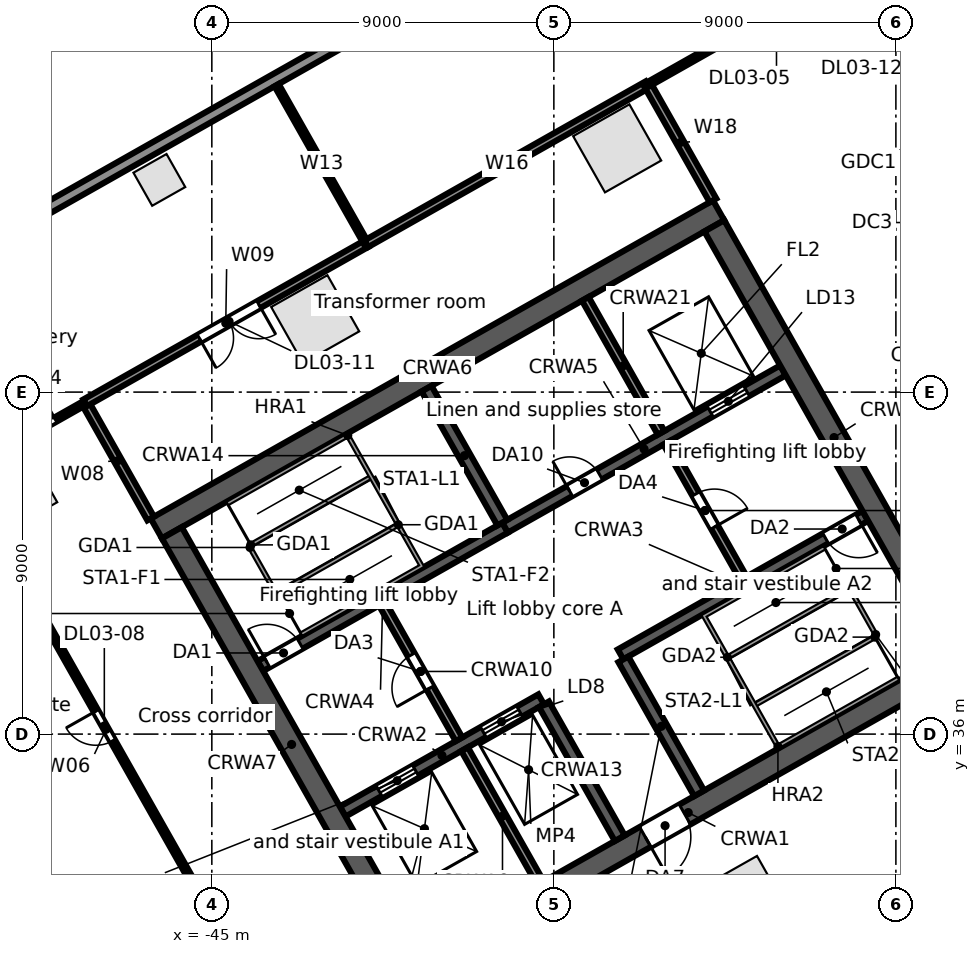
"""IFC4 building model, lengths in metres.
Left out: names, types, materials, properties, quantities, classifications, styles, units other than length and angle.
Written with IfcOpenShell. Run it as: python <this file> out.ifc"""

import sys

from ifc_helpers import new_model, si_unit, direction, frame, frame_2d, origin, origin_2d, place, context, subcontext, project, spatial, rectangle, extrude, element, fill, save


model = new_model("IFC4")
c1 = context("Model", 3, precision=1e-05, world=origin(), true_north=direction((0.0, 1.0)))
c2 = subcontext(c1, "Body", "Model", "MODEL_VIEW")
j1 = project(units=[si_unit("LENGTHUNIT", "METRE"), si_unit("PLANEANGLEUNIT", "RADIAN")], contexts=[c1])
p1 = place(None, origin())
s1 = spatial("IfcSite", under=j1, at=p1, CompositionType="ELEMENT")
p2 = place(p1, origin())
s2 = spatial("IfcBuilding", under=s1, at=p2, CompositionType="ELEMENT")
p3 = place(p2, frame((0.0, 0.0, 21.5)))
s3 = spatial("IfcBuildingStorey", under=s2, at=p3, CompositionType="ELEMENT", Elevation=21.5)
for number, where, z_axis, x_axis in (
    (1, (-34.334, 51.414, 0.0), (0.0, 0.0, 1.0), (-0.87, -0.492, 0.0)),
    (2, (-42.28, 46.919, 0.0), (0.0, 0.0, 1.0), (-0.87, -0.492, 0.0)),
    (3, (-50.226, 42.423, 0.0), (0.0, 0.0, 1.0), (-0.87, -0.492, 0.0)),
    (4, (-30.976, 31.635, 0.0), (0.0, 0.0, 1.0), (0.87, 0.492, 0.0)),
):
    element("IfcColumn", number, at=place(p3, frame(where, z_axis=z_axis, x_axis=x_axis)), inside=s3, PredefinedType="COLUMN", context=c2, shape_type="SweptSolid", body=[
        extrude(rectangle(XDim=1.7, YDim=1.7, at=origin_2d()), origin(), (0.0, 0.0, 1.0), 5.0),
    ])
p4 = place(p3, frame((-46.381, 50.584, 0.0), z_axis=(0.0, 0.0, 1.0), x_axis=(-0.87035569594, -0.492423560103, 0.0)))
e5 = element("IfcColumn", 5, at=p4, inside=s3, PredefinedType="COLUMN", context=c2, shape_type="SweptSolid", body=[
    extrude(rectangle(XDim=1.0, YDim=1.0, at=origin_2d()), origin(), (0.0, 0.0, 1.0), 4.68),
])
p5 = place(p3, frame((-63.707, 41.701, 0.0), z_axis=(0.0, 0.0, 1.0), x_axis=(0.870355510268, 0.492423888277, 0.0)))
e6 = element("IfcWall", 6, at=p5, inside=s3, PredefinedType="STANDARD", context=c2, shape_type="SweptSolid", body=[
    extrude(rectangle(XDim=67.903, YDim=0.3, at=frame_2d((33.952, 0.0))), origin(), (0.0, 0.0, 1.0), 4.68),
])
p6 = place(p3, frame((-45.526, 21.522, 0.0), z_axis=(0.0, 0.0, 1.0), x_axis=(-0.857164837164, 0.515042174903, 0.0)))
e7 = element("IfcWall", 7, at=p6, inside=s3, PredefinedType="STANDARD", context=c2, shape_type="SweptSolid", body=[
    extrude(rectangle(XDim=21.35, YDim=0.3, at=frame_2d((10.675, 0.0))), origin(), (0.0, 0.0, 1.0), 4.68),
])
p7 = place(p3, frame((-39.862, 29.749, 0.0), z_axis=(0.0, 0.0, 1.0), x_axis=(0.870350116061, 0.492433422375, 0.0)))
e8 = element("IfcWall", 8, at=p7, inside=s3, PredefinedType="SOLIDWALL", context=c2, shape_type="SweptSolid", body=[
    extrude(rectangle(XDim=17.0, YDim=0.6, at=frame_2d((8.5, 0.0))), origin(), (0.0, 0.0, 1.0), 4.68),
])
p8 = place(p7, frame((7.2, 0.0, 0.0)))
e9 = element("IfcOpeningElement", 9, at=p8, cuts=e8, PredefinedType="OPENING", context=c2, shape_type="SweptSolid", body=[
    extrude(rectangle(XDim=1.2, YDim=2.1, at=frame_2d((0.6, 1.05))), frame((0.0, 0.31, 0.0), z_axis=(0.0, -1.0, 0.0), x_axis=(1.0, 0.0, 0.0)), (0.0, 0.0, 1.0), 0.62),
])
p9 = place(p3, frame((-41.556, 33.961, 0.0), z_axis=(0.0, 0.0, 1.0), x_axis=(0.870343731308, 0.492444706919, 0.0)))
e10 = element("IfcWall", 10, at=p9, inside=s3, PredefinedType="SOLIDWALL", context=c2, shape_type="SweptSolid", body=[
    extrude(rectangle(XDim=6.0, YDim=0.3, at=frame_2d((3.0, 0.0))), origin(), (0.0, 0.0, 1.0), 4.68),
])
p10 = place(p9, frame((1.1, 0.0, 0.0)))
e11 = element("IfcOpeningElement", 11, at=p10, cuts=e10, PredefinedType="OPENING", context=c2, shape_type="SweptSolid", body=[
    extrude(rectangle(XDim=1.1, YDim=2.1, at=frame_2d((0.55, 1.05))), frame((0.0, 0.16, 0.0), z_axis=(0.0, -1.0, 0.0), x_axis=(1.0, 0.0, 0.0)), (0.0, 0.0, 1.0), 0.32),
])
p11 = place(p9, frame((4.25, 0.0, 0.0)))
e12 = element("IfcOpeningElement", 12, at=p11, cuts=e10, PredefinedType="OPENING", context=c2, shape_type="SweptSolid", body=[
    extrude(rectangle(XDim=1.1, YDim=2.1, at=frame_2d((0.55, 1.05))), frame((0.0, 0.16, 0.0), z_axis=(0.0, -1.0, 0.0), x_axis=(1.0, 0.0, 0.0)), (0.0, 0.0, 1.0), 0.32),
])
p12 = place(p3, frame((-34.245, 38.097, 0.0), z_axis=(0.0, 0.0, 1.0), x_axis=(0.870364910201, 0.492407273597, 0.0)))
e13 = element("IfcWall", 13, at=p12, inside=s3, PredefinedType="SOLIDWALL", context=c2, shape_type="SweptSolid", body=[
    extrude(rectangle(XDim=7.4, YDim=0.3, at=frame_2d((3.7, 0.0))), origin(), (0.0, 0.0, 1.0), 4.68),
])
p13 = place(p12, frame((6.2, 0.0, 0.0)))
e14 = element("IfcOpeningElement", 14, at=p13, cuts=e13, PredefinedType="OPENING", context=c2, shape_type="SweptSolid", body=[
    extrude(rectangle(XDim=1.0, YDim=2.1, at=frame_2d((0.5, 1.05))), frame((0.0, 0.16, 0.0), z_axis=(0.0, -1.0, 0.0), x_axis=(1.0, 0.0, 0.0)), (0.0, 0.0, 1.0), 0.32),
])
p14 = place(p3, frame((-43.723, 37.791, 0.0), z_axis=(0.0, 0.0, 1.0), x_axis=(0.87035077051, 0.49243226567, 0.0)))
e15 = element("IfcWall", 15, at=p14, inside=s3, PredefinedType="SOLIDWALL", context=c2, shape_type="SweptSolid", body=[
    extrude(rectangle(XDim=7.4, YDim=0.3, at=frame_2d((3.7, 0.0))), origin(), (0.0, 0.0, 1.0), 4.68),
])
p15 = place(p14, frame((0.2, 0.0, 0.0)))
e16 = element("IfcOpeningElement", 16, at=p15, cuts=e15, PredefinedType="OPENING", context=c2, shape_type="SweptSolid", body=[
    extrude(rectangle(XDim=1.0, YDim=2.1, at=frame_2d((0.5, 1.05))), frame((0.0, 0.16, 0.0), z_axis=(0.0, -1.0, 0.0), x_axis=(1.0, 0.0, 0.0)), (0.0, 0.0, 1.0), 0.32),
])
p16 = place(p3, frame((-37.282, 41.435, 0.0), z_axis=(0.0, 0.0, 1.0), x_axis=(0.870356516133, 0.492422110414, 0.0)))
e17 = element("IfcWall", 17, at=p16, inside=s3, PredefinedType="SOLIDWALL", context=c2, shape_type="SweptSolid", body=[
    extrude(rectangle(XDim=8.4, YDim=0.3, at=frame_2d((4.2, 0.0))), origin(), (0.0, 0.0, 1.0), 4.68),
])
p17 = place(p16, frame((6.2, 0.0, 0.0)))
e18 = element("IfcOpeningElement", 18, at=p17, cuts=e17, PredefinedType="OPENING", context=c2, shape_type="SweptSolid", body=[
    extrude(rectangle(XDim=1.1, YDim=2.1, at=frame_2d((0.55, 1.05))), frame((0.0, 0.16, 0.0), z_axis=(0.0, -1.0, 0.0), x_axis=(1.0, 0.0, 0.0)), (0.0, 0.0, 1.0), 0.32),
])
p18 = place(p16, frame((1.95, 0.0, 0.0)))
e19 = element("IfcOpeningElement", 19, at=p18, cuts=e17, PredefinedType="OPENING", context=c2, shape_type="SweptSolid", body=[
    extrude(rectangle(XDim=0.9, YDim=2.1, at=frame_2d((0.45, 1.05))), frame((0.0, 0.16, 0.0), z_axis=(0.0, -1.0, 0.0), x_axis=(1.0, 0.0, 0.0)), (0.0, 0.0, 1.0), 0.32),
])
p19 = place(p3, frame((-46.461, 41.412, 0.0), z_axis=(0.0, 0.0, 1.0), x_axis=(0.870350116061, 0.492433422375, 0.0)))
e20 = element("IfcWall", 20, at=p19, inside=s3, PredefinedType="SOLIDWALL", context=c2, shape_type="SweptSolid", body=[
    extrude(rectangle(XDim=17.0, YDim=0.6, at=frame_2d((8.5, 0.0))), origin(), (0.0, 0.0, 1.0), 4.68),
])
p20 = place(p3, frame((-46.052, 41.298, 0.0), z_axis=(0.0, 0.0, 1.0), x_axis=(0.492418598281, -0.870358503186, 0.0)))
e21 = element("IfcWall", 21, at=p20, inside=s3, PredefinedType="SOLIDWALL", context=c2, shape_type="SweptSolid", body=[
    extrude(rectangle(XDim=12.8, YDim=0.6, at=frame_2d((6.4, 0.0))), origin(), (0.0, 0.0, 1.0), 4.68),
])
p21 = place(p3, frame((-38.349, 35.603, 0.0), z_axis=(0.0, 0.0, 1.0), x_axis=(0.49241474071, -0.870360685654, 0.0)))
e22 = element("IfcWall", 22, at=p21, inside=s3, PredefinedType="SOLIDWALL", context=c2, shape_type="SweptSolid", body=[
    extrude(rectangle(XDim=4.05, YDim=0.2, at=frame_2d((2.025, 0.0))), origin(), (0.0, 0.0, 1.0), 4.68),
])
p22 = place(p3, frame((-40.516, 39.433, 0.0), z_axis=(0.0, 0.0, 1.0), x_axis=(0.492453559952, -0.87033872216, 0.0)))
e23 = element("IfcWall", 23, at=p22, inside=s3, PredefinedType="PARTITIONING", context=c2, shape_type="SweptSolid", body=[
    extrude(rectangle(XDim=4.1, YDim=0.2, at=frame_2d((2.05, 0.0))), origin(), (0.0, 0.0, 1.0), 4.68),
])
p23 = place(p22, frame((1.55, 0.0, 0.0)))
e24 = element("IfcOpeningElement", 24, at=p23, cuts=e23, PredefinedType="OPENING", context=c2, shape_type="SweptSolid", body=[
    extrude(rectangle(XDim=1.0, YDim=2.1, at=frame_2d((0.5, 1.05))), frame((0.0, 0.11, 0.0), z_axis=(0.0, -1.0, 0.0), x_axis=(1.0, 0.0, 0.0)), (0.0, 0.0, 1.0), 0.22),
])
p24 = place(p3, frame((-36.26, 36.785, 0.0), z_axis=(0.0, 0.0, 1.0), x_axis=(0.492440575896, -0.870346068648, 0.0)))
e25 = element("IfcWall", 25, at=p24, inside=s3, PredefinedType="SOLIDWALL", context=c2, shape_type="SweptSolid", body=[
    extrude(rectangle(XDim=4.05, YDim=0.3, at=frame_2d((2.025, 0.0))), origin(), (0.0, 0.0, 1.0), 4.68),
])
p25 = place(p3, frame((-39.35, 45.09, 0.0), z_axis=(0.0, 0.0, 1.0), x_axis=(0.49241474071, -0.870360685654, 0.0)))
e26 = element("IfcWall", 26, at=p25, inside=s3, PredefinedType="SOLIDWALL", context=c2, shape_type="SweptSolid", body=[
    extrude(rectangle(XDim=4.05, YDim=0.3, at=frame_2d((2.025, 0.0))), origin(), (0.0, 0.0, 1.0), 4.68),
])
p26 = place(p3, frame((-34.171, 37.967, 0.0), z_axis=(0.0, 0.0, 1.0), x_axis=(0.492394910396, -0.870371904542, 0.0)))
e27 = element("IfcWall", 27, at=p26, inside=s3, PredefinedType="SOLIDWALL", context=c2, shape_type="SweptSolid", body=[
    extrude(rectangle(XDim=4.05, YDim=0.3, at=frame_2d((2.025, 0.0))), origin(), (0.0, 0.0, 1.0), 4.68),
])
p27 = place(p3, frame((-33.031, 43.667, 0.0), z_axis=(0.0, 0.0, 1.0), x_axis=(0.492408451753, -0.87036424366, 0.0)))
e28 = element("IfcWall", 28, at=p27, inside=s3, PredefinedType="PARTITIONING", context=c2, shape_type="SweptSolid", body=[
    extrude(rectangle(XDim=4.1, YDim=0.2, at=frame_2d((2.05, 0.0))), origin(), (0.0, 0.0, 1.0), 4.68),
])
p28 = place(p27, frame((1.55, 0.0, 0.0)))
e29 = element("IfcOpeningElement", 29, at=p28, cuts=e28, PredefinedType="OPENING", context=c2, shape_type="SweptSolid", body=[
    extrude(rectangle(XDim=1.0, YDim=2.1, at=frame_2d((0.5, 1.05))), frame((0.0, 0.11, 0.0), z_axis=(0.0, -1.0, 0.0), x_axis=(1.0, 0.0, 0.0)), (0.0, 0.0, 1.0), 0.22),
])
p29 = place(p3, frame((-35.173, 47.454, 0.0), z_axis=(0.0, 0.0, 1.0), x_axis=(0.492440575896, -0.870346068648, 0.0)))
e30 = element("IfcWall", 30, at=p29, inside=s3, PredefinedType="SOLIDWALL", context=c2, shape_type="SweptSolid", body=[
    extrude(rectangle(XDim=4.05, YDim=0.2, at=frame_2d((2.025, 0.0))), origin(), (0.0, 0.0, 1.0), 4.68),
])
p30 = place(p3, frame((-31.778, 49.374, 0.0), z_axis=(0.0, 0.0, 1.0), x_axis=(0.492433046652, -0.870350328641, 0.0)))
e31 = element("IfcWall", 31, at=p30, inside=s3, PredefinedType="SOLIDWALL", context=c2, shape_type="SweptSolid", body=[
    extrude(rectangle(XDim=12.8, YDim=0.6, at=frame_2d((6.4, 0.0))), origin(), (0.0, 0.0, 1.0), 4.68),
])
p31 = place(p3, frame((-51.596, 42.873, 0.0), z_axis=(0.0, 0.0, 1.0), x_axis=(0.87043427122, 0.492284652905, 0.0)))
e32 = element("IfcWall", 32, at=p31, inside=s3, PredefinedType="PARTITIONING", context=c2, shape_type="SweptSolid", body=[
    extrude(rectangle(XDim=3.75, YDim=0.125, at=frame_2d((1.875, 0.0))), origin(), (0.0, 0.0, 1.0), 4.68),
])
p32 = place(p31, frame((1.95, 0.0, 0.0)))
e33 = element("IfcOpeningElement", 33, at=p32, cuts=e32, PredefinedType="OPENING", context=c2, shape_type="SweptSolid", body=[
    extrude(rectangle(XDim=0.9, YDim=2.1, at=frame_2d((0.45, 1.05))), frame((0.0, 0.073, 0.0), z_axis=(0.0, -1.0, 0.0), x_axis=(1.0, 0.0, 0.0)), (0.0, 0.0, 1.0), 0.145),
])
p33 = place(p3, frame((-51.596, 42.873, 0.0), z_axis=(0.0, 0.0, 1.0), x_axis=(0.492435038471, -0.870349201692, 0.0)))
e34 = element("IfcWall", 34, at=p33, inside=s3, PredefinedType="PARTITIONING", context=c2, shape_type="SweptSolid", body=[
    extrude(rectangle(XDim=15.501, YDim=0.125, at=frame_2d((7.75, 0.0))), origin(), (0.0, 0.0, 1.0), 3.742),
])
p34 = place(p33, frame((7.2, 0.0, 0.0)))
e35 = element("IfcOpeningElement", 35, at=p34, cuts=e34, PredefinedType="OPENING", context=c2, shape_type="SweptSolid", body=[
    extrude(rectangle(XDim=0.9, YDim=2.1, at=frame_2d((0.45, 1.05))), frame((0.0, 0.073, 0.0), z_axis=(0.0, -1.0, 0.0), x_axis=(1.0, 0.0, 0.0)), (0.0, 0.0, 1.0), 0.145),
])
p35 = place(p3, frame((-48.332, 44.719, 0.0), z_axis=(0.0, 0.0, 1.0), x_axis=(0.492392845909, -0.87037307248, 0.0)))
e36 = element("IfcWall", 36, at=p35, inside=s3, PredefinedType="PARTITIONING", context=c2, shape_type="SweptSolid", body=[
    extrude(rectangle(XDim=3.5, YDim=0.2, at=frame_2d((1.75, 0.0))), origin(), (0.0, 0.0, 1.0), 3.96),
])
p36 = place(p3, frame((-48.332, 44.719, 0.0), z_axis=(0.0, 0.0, 1.0), x_axis=(0.870331650579, 0.492466057713, 0.0)))
e37 = element("IfcWall", 37, at=p36, inside=s3, PredefinedType="PARTITIONING", context=c2, shape_type="SweptSolid", body=[
    extrude(rectangle(XDim=8.5, YDim=0.2, at=frame_2d((4.25, 0.0))), origin(), (0.0, 0.0, 1.0), 4.054),
])
p37 = place(p36, frame((3.45, 0.0, 0.0)))
e38 = element("IfcOpeningElement", 38, at=p37, cuts=e37, PredefinedType="OPENING", context=c2, shape_type="SweptSolid", body=[
    extrude(rectangle(XDim=1.8, YDim=2.1, at=frame_2d((0.9, 1.05))), frame((0.0, 0.11, 0.0), z_axis=(0.0, -1.0, 0.0), x_axis=(1.0, 0.0, 0.0)), (0.0, 0.0, 1.0), 0.22),
])
p38 = place(p3, frame((-43.295, 53.077, 0.0), z_axis=(0.0, 0.0, 1.0), x_axis=(0.492503605136, -0.87031040378, 0.0)))
e39 = element("IfcWall", 39, at=p38, inside=s3, PredefinedType="PARTITIONING", context=c2, shape_type="SweptSolid", body=[
    extrude(rectangle(XDim=4.793, YDim=0.125, at=frame_2d((2.397, 0.0))), origin(), (0.0, 0.0, 1.0), 3.96),
])
p39 = place(p3, frame((-40.934, 48.905, 0.0), z_axis=(0.0, 0.0, 1.0), x_axis=(0.870387854278, 0.492366716102, 0.0)))
e40 = element("IfcWall", 40, at=p39, inside=s3, PredefinedType="PARTITIONING", context=c2, shape_type="SweptSolid", body=[
    extrude(rectangle(XDim=8.5, YDim=0.2, at=frame_2d((4.25, 0.0))), origin(), (0.0, 0.0, 1.0), 4.054),
])
p40 = place(p3, frame((-33.536, 53.09, 0.0), z_axis=(0.0, 0.0, 1.0), x_axis=(0.492521469645, -0.870300294116, 0.0)))
e41 = element("IfcWall", 41, at=p40, inside=s3, PredefinedType="PARTITIONING", context=c2, shape_type="SweptSolid", body=[
    extrude(rectangle(XDim=3.5, YDim=0.2, at=frame_2d((1.75, 0.0))), origin(), (0.0, 0.0, 1.0), 3.96),
])
p41 = place(p3, frame((-33.536, 53.09, 0.0), z_axis=(0.0, 0.0, 1.0), x_axis=(0.870327439455, 0.492473499928, 0.0)))
e42 = element("IfcWall", 42, at=p41, inside=s3, PredefinedType="PARTITIONING", context=c2, shape_type="SweptSolid", body=[
    extrude(rectangle(XDim=8.0, YDim=0.125, at=frame_2d((4.0, 0.0))), origin(), (0.0, 0.0, 1.0), 3.742),
])
p42 = place(p41, frame((3.45, 0.0, 0.0)))
e43 = element("IfcOpeningElement", 43, at=p42, cuts=e42, PredefinedType="OPENING", context=c2, shape_type="SweptSolid", body=[
    extrude(rectangle(XDim=0.9, YDim=2.1, at=frame_2d((0.45, 1.05))), frame((0.0, 0.073, 0.0), z_axis=(0.0, -1.0, 0.0), x_axis=(1.0, 0.0, 0.0)), (0.0, 0.0, 1.0), 0.145),
])
p43 = place(p17, origin())
e44 = element("IfcDoor", 44, at=p43, inside=s3, OperationType="DOUBLE_DOOR_SLIDING", PredefinedType="DOOR", context=c2, shape_type="SweptSolid", body=[
    extrude(rectangle(XDim=1.1, YDim=2.1, at=frame_2d((0.55, 1.05))), frame((0.0, 0.025, 0.0), z_axis=(0.0, -1.0, 0.0), x_axis=(1.0, 0.0, 0.0)), (0.0, 0.0, 1.0), 0.05),
])
fill(e18, e44)
p44 = place(p10, origin())
e45 = element("IfcDoor", 45, at=p44, inside=s3, OperationType="DOUBLE_DOOR_SLIDING", PredefinedType="DOOR", context=c2, shape_type="SweptSolid", body=[
    extrude(rectangle(XDim=1.1, YDim=2.1, at=frame_2d((0.55, 1.05))), frame((0.0, 0.025, 0.0), z_axis=(0.0, -1.0, 0.0), x_axis=(1.0, 0.0, 0.0)), (0.0, 0.0, 1.0), 0.05),
])
fill(e11, e45)
p45 = place(p11, origin())
e46 = element("IfcDoor", 46, at=p45, inside=s3, OperationType="DOUBLE_DOOR_SLIDING", PredefinedType="DOOR", context=c2, shape_type="SweptSolid", body=[
    extrude(rectangle(XDim=1.1, YDim=2.1, at=frame_2d((0.55, 1.05))), frame((0.0, 0.025, 0.0), z_axis=(0.0, -1.0, 0.0), x_axis=(1.0, 0.0, 0.0)), (0.0, 0.0, 1.0), 0.05),
])
fill(e12, e46)
p46 = place(p15, origin())
e47 = element("IfcDoor", 47, at=p46, inside=s3, OperationType="SINGLE_SWING_LEFT", PredefinedType="DOOR", context=c2, shape_type="SweptSolid", body=[
    extrude(rectangle(XDim=1.0, YDim=2.1, at=frame_2d((0.5, 1.05))), frame((0.0, 0.025, 0.0), z_axis=(0.0, -1.0, 0.0), x_axis=(1.0, 0.0, 0.0)), (0.0, 0.0, 1.0), 0.05),
])
fill(e16, e47)
p47 = place(p13, frame((1.0, 0.0, 0.0), z_axis=(0.0, 0.0, 1.0), x_axis=(-1.0, 0.0, 0.0)))
e48 = element("IfcDoor", 48, at=p47, inside=s3, OperationType="SINGLE_SWING_LEFT", PredefinedType="DOOR", context=c2, shape_type="SweptSolid", body=[
    extrude(rectangle(XDim=1.0, YDim=2.1, at=frame_2d((0.5, 1.05))), frame((0.0, 0.025, 0.0), z_axis=(0.0, -1.0, 0.0), x_axis=(1.0, 0.0, 0.0)), (0.0, 0.0, 1.0), 0.05),
])
fill(e14, e48)
p48 = place(p23, frame((1.0, 0.0, 0.0), z_axis=(0.0, 0.0, 1.0), x_axis=(-1.0, 0.0, 0.0)))
e49 = element("IfcDoor", 49, at=p48, inside=s3, OperationType="SINGLE_SWING_LEFT", PredefinedType="DOOR", context=c2, shape_type="SweptSolid", body=[
    extrude(rectangle(XDim=1.0, YDim=2.1, at=frame_2d((0.5, 1.05))), frame((0.0, 0.025, 0.0), z_axis=(0.0, -1.0, 0.0), x_axis=(1.0, 0.0, 0.0)), (0.0, 0.0, 1.0), 0.05),
])
fill(e24, e49)
p49 = place(p28, origin())
e50 = element("IfcDoor", 50, at=p49, inside=s3, OperationType="SINGLE_SWING_RIGHT", PredefinedType="DOOR", context=c2, shape_type="SweptSolid", body=[
    extrude(rectangle(XDim=1.0, YDim=2.1, at=frame_2d((0.5, 1.05))), frame((0.0, 0.025, 0.0), z_axis=(0.0, -1.0, 0.0), x_axis=(1.0, 0.0, 0.0)), (0.0, 0.0, 1.0), 0.05),
])
fill(e29, e50)
p50 = place(p8, frame((1.2, 0.0, 0.0), z_axis=(0.0, 0.0, 1.0), x_axis=(-1.0, 0.0, 0.0)))
e51 = element("IfcDoor", 51, at=p50, inside=s3, OperationType="SINGLE_SWING_RIGHT", PredefinedType="DOOR", context=c2, shape_type="SweptSolid", body=[
    extrude(rectangle(XDim=1.2, YDim=2.1, at=frame_2d((0.6, 1.05))), frame((0.0, 0.025, 0.0), z_axis=(0.0, -1.0, 0.0), x_axis=(1.0, 0.0, 0.0)), (0.0, 0.0, 1.0), 0.05),
])
fill(e9, e51)
p51 = place(p18, origin())
e52 = element("IfcDoor", 52, at=p51, inside=s3, OperationType="SINGLE_SWING_LEFT", PredefinedType="DOOR", context=c2, shape_type="SweptSolid", body=[
    extrude(rectangle(XDim=0.9, YDim=2.1, at=frame_2d((0.45, 1.05))), frame((0.0, 0.025, 0.0), z_axis=(0.0, -1.0, 0.0), x_axis=(1.0, 0.0, 0.0)), (0.0, 0.0, 1.0), 0.05),
])
fill(e19, e52)
p52 = place(p32, origin())
e53 = element("IfcDoor", 53, at=p52, inside=s3, OperationType="SINGLE_SWING_RIGHT", PredefinedType="DOOR", context=c2, shape_type="SweptSolid", body=[
    extrude(rectangle(XDim=0.9, YDim=2.1, at=frame_2d((0.45, 1.05))), frame((0.0, 0.025, 0.0), z_axis=(0.0, -1.0, 0.0), x_axis=(1.0, 0.0, 0.0)), (0.0, 0.0, 1.0), 0.05),
])
fill(e33, e53)
p53 = place(p34, frame((0.9, 0.0, 0.0), z_axis=(0.0, 0.0, 1.0), x_axis=(-1.0, 0.0, 0.0)))
e54 = element("IfcDoor", 54, at=p53, inside=s3, OperationType="SINGLE_SWING_RIGHT", PredefinedType="DOOR", context=c2, shape_type="SweptSolid", body=[
    extrude(rectangle(XDim=0.9, YDim=2.1, at=frame_2d((0.45, 1.05))), frame((0.0, 0.025, 0.0), z_axis=(0.0, -1.0, 0.0), x_axis=(1.0, 0.0, 0.0)), (0.0, 0.0, 1.0), 0.05),
])
fill(e35, e54)
p54 = place(p37, frame((1.8, 0.0, 0.0), z_axis=(0.0, 0.0, 1.0), x_axis=(-1.0, 0.0, 0.0)))
e55 = element("IfcDoor", 55, at=p54, inside=s3, OperationType="DOUBLE_DOOR_SINGLE_SWING", PredefinedType="DOOR", context=c2, shape_type="SweptSolid", body=[
    extrude(rectangle(XDim=1.8, YDim=2.1, at=frame_2d((0.9, 1.05))), frame((0.0, 0.025, 0.0), z_axis=(0.0, -1.0, 0.0), x_axis=(1.0, 0.0, 0.0)), (0.0, 0.0, 1.0), 0.05),
])
fill(e38, e55)
save(model, sys.argv[1])
